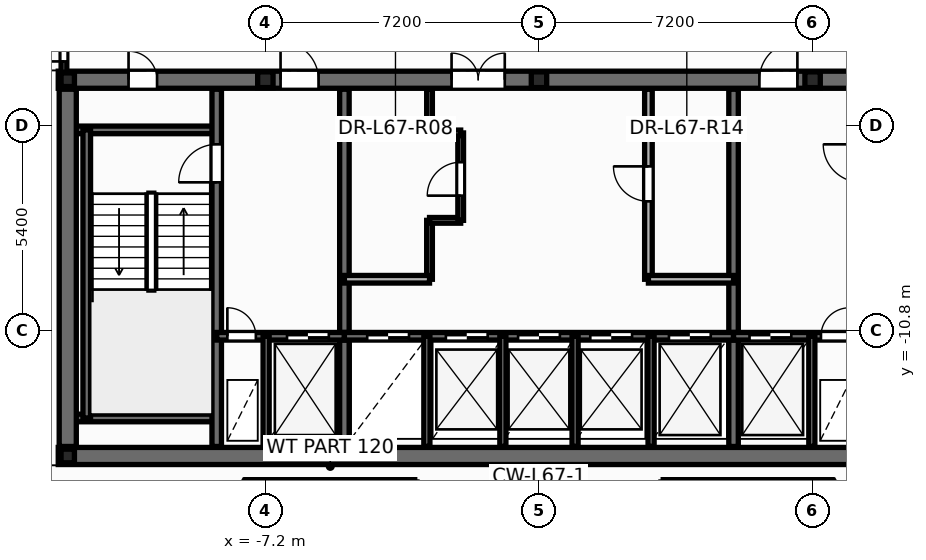
"""IFC4 building model, lengths in metres.
Left out: names, types, materials, properties, quantities, classifications, styles, units other than length and angle.
Written with IfcOpenShell. Run it as: python <this file> out.ifc"""

import sys

from ifc_helpers import new_model, si_unit, direction, frame, frame_2d, origin, origin_2d, place, context, subcontext, project, spatial, rectangle, i_section, extrude, element, fill, save


model = new_model("IFC4")
c1 = context("Model", 3, precision=1e-05, world=origin(), true_north=direction((0.0, 1.0)))
c2 = subcontext(c1, "Body", "Model", "MODEL_VIEW")
j1 = project(units=[si_unit("LENGTHUNIT", "METRE"), si_unit("PLANEANGLEUNIT", "RADIAN")], contexts=[c1])
p1 = place(None, origin())
s1 = spatial("IfcSite", under=j1, at=p1, CompositionType="ELEMENT")
p2 = place(p1, origin())
s2 = spatial("IfcBuilding", under=s1, at=p2, CompositionType="ELEMENT")
p3 = place(p2, frame((0.0, 0.0, 256.2)))
s3 = spatial("IfcBuildingStorey", under=s2, at=p3, CompositionType="ELEMENT", Elevation=256.2)
for number, where, z_axis, x_axis in (
    (1, (-12.4, -14.1, 0.0), (0.0, 0.0, 1.0), (1.0, 0.0, 0.0)),
    (2, (-12.4, -4.2, 0.0), (0.0, 0.0, 1.0), (1.0, 0.0, 0.0)),
):
    element("IfcColumn", number, at=place(p3, frame(where, z_axis=z_axis, x_axis=x_axis)), inside=s3, PredefinedType="COLUMN", context=c2, shape_type="SweptSolid", body=[
        extrude(i_section(OverallWidth=0.352, OverallDepth=0.359, WebThickness=0.018, FlangeThickness=0.026, at=origin_2d()), origin(), (0.0, 0.0, 1.0), 3.6),
    ])
for number, where, z_axis, x_axis in (
    (3, (-7.2, -4.2, 0.0), (0.0, 0.0, 1.0), (1.0, 0.0, 0.0)),
    (4, (0.0, -4.2, 0.0), (0.0, 0.0, 1.0), (1.0, 0.0, 0.0)),
    (5, (7.2, -4.2, 0.0), (0.0, 0.0, 1.0), (1.0, 0.0, 0.0)),
):
    element("IfcColumn", number, at=place(p3, frame(where, z_axis=z_axis, x_axis=x_axis)), inside=s3, PredefinedType="PILASTER", context=c2, shape_type="SweptSolid", body=[
        extrude(i_section(OverallWidth=0.405, OverallDepth=0.414, WebThickness=0.022, FlangeThickness=0.032, at=origin_2d()), origin(), (0.0, 0.0, 1.0), 3.6),
    ])
p4 = place(p3, frame((-2.88, -9.45, 0.0), z_axis=(0.0, 0.0, 1.0), x_axis=(0.0, 1.0, 0.0)))
e6 = element("IfcWall", 6, at=p4, inside=s3, PredefinedType="PARTITIONING", context=c2, shape_type="SweptSolid", body=[
    extrude(rectangle(XDim=1.55, YDim=0.15, at=frame_2d((0.775, 0.0))), origin(), (0.0, 0.0, 1.0), 3.345),
])
p5 = place(p3, frame((-2.88, -7.9, 0.0), z_axis=(0.0, 0.0, 1.0), x_axis=(1.0, 0.0, 0.0)))
e7 = element("IfcWall", 7, at=p5, inside=s3, PredefinedType="PARTITIONING", context=c2, shape_type="SweptSolid", body=[
    extrude(rectangle(XDim=0.82, YDim=0.15, at=frame_2d((0.41, 0.0))), origin(), (0.0, 0.0, 1.0), 3.345),
])
p6 = place(p3, frame((-2.06, -7.9, 0.0), z_axis=(0.0, 0.0, 1.0), x_axis=(0.0, 1.0, 0.0)))
e8 = element("IfcWall", 8, at=p6, inside=s3, PredefinedType="PARTITIONING", context=c2, shape_type="SweptSolid", body=[
    extrude(rectangle(XDim=2.3, YDim=0.15, at=frame_2d((1.15, 0.0))), origin(), (0.0, 0.0, 1.0), 3.345),
])
p7 = place(p6, frame((0.65, 0.0, 0.0)))
e9 = element("IfcOpeningElement", 9, at=p7, cuts=e8, PredefinedType="OPENING", context=c2, shape_type="SweptSolid", body=[
    extrude(rectangle(XDim=0.886, YDim=2.104, at=frame_2d((0.44, 1.052))), frame((0.0, 0.085, 0.0), z_axis=(0.0, -1.0, 0.0), x_axis=(1.0, 0.0, 0.0)), (0.0, 0.0, 1.0), 0.17),
])
p8 = place(p3, frame((-2.88, -5.6, 0.0), z_axis=(0.0, 0.0, 1.0), x_axis=(1.0, 0.0, 0.0)))
e10 = element("IfcWall", 10, at=p8, inside=s3, PredefinedType="PARTITIONING", context=c2, shape_type="SweptSolid", body=[
    extrude(rectangle(XDim=0.82, YDim=0.15, at=frame_2d((0.41, 0.0))), origin(), (0.0, 0.0, 1.0), 3.345),
])
p9 = place(p3, frame((-2.88, -5.6, 0.0), z_axis=(0.0, 0.0, 1.0), x_axis=(0.0, 1.0, 0.0)))
e11 = element("IfcWall", 11, at=p9, inside=s3, PredefinedType="PARTITIONING", context=c2, shape_type="SweptSolid", body=[
    extrude(rectangle(XDim=1.15, YDim=0.15, at=frame_2d((0.575, 0.0))), origin(), (0.0, 0.0, 1.0), 3.345),
])
p10 = place(p3, frame((-12.65, -14.1, 0.0), z_axis=(0.0, 0.0, 1.0), x_axis=(1.0, 0.0, 0.0)))
e12 = element("IfcWall", 12, at=p10, inside=s3, PredefinedType="SHEAR", context=c2, shape_type="SweptSolid", body=[
    extrude(rectangle(XDim=25.3, YDim=0.45, at=frame_2d((12.65, 0.0))), origin(), (0.0, 0.0, 1.0), 3.6),
])
p11 = place(p3, frame((-12.65, -4.2, 0.0), z_axis=(0.0, 0.0, 1.0), x_axis=(1.0, 0.0, 0.0)))
e13 = element("IfcWall", 13, at=p11, inside=s3, PredefinedType="SHEAR", context=c2, shape_type="SweptSolid", body=[
    extrude(rectangle(XDim=25.3, YDim=0.45, at=frame_2d((12.65, 0.0))), origin(), (0.0, 0.0, 1.0), 3.6),
])
p12 = place(p11, frame((1.85, 0.0, 0.0)))
e14 = element("IfcOpeningElement", 14, at=p12, cuts=e13, PredefinedType="OPENING", context=c2, shape_type="SweptSolid", body=[
    extrude(rectangle(XDim=0.756, YDim=2.054, at=frame_2d((0.375, 1.027))), frame((0.0, 0.235, 0.0), z_axis=(0.0, -1.0, 0.0), x_axis=(1.0, 0.0, 0.0)), (0.0, 0.0, 1.0), 0.47),
])
p13 = place(p11, frame((21.85, 0.0, 0.0)))
e15 = element("IfcOpeningElement", 15, at=p13, cuts=e13, PredefinedType="OPENING", context=c2, shape_type="SweptSolid", body=[
    extrude(rectangle(XDim=0.756, YDim=2.054, at=frame_2d((0.375, 1.027))), frame((0.0, 0.235, 0.0), z_axis=(0.0, -1.0, 0.0), x_axis=(1.0, 0.0, 0.0)), (0.0, 0.0, 1.0), 0.47),
])
p14 = place(p11, frame((23.5, 0.0, 0.0)))
e16 = element("IfcOpeningElement", 16, at=p14, cuts=e13, PredefinedType="OPENING", context=c2, shape_type="SweptSolid", body=[
    extrude(rectangle(XDim=0.756, YDim=2.054, at=frame_2d((0.375, 1.027))), frame((0.0, 0.235, 0.0), z_axis=(0.0, -1.0, 0.0), x_axis=(1.0, 0.0, 0.0)), (0.0, 0.0, 1.0), 0.47),
])
p15 = place(p11, frame((5.85, 0.0, 0.0)))
e17 = element("IfcOpeningElement", 17, at=p15, cuts=e13, PredefinedType="OPENING", context=c2, shape_type="SweptSolid", body=[
    extrude(rectangle(XDim=1.006, YDim=2.104, at=frame_2d((0.5, 1.052))), frame((0.0, 0.235, 0.0), z_axis=(0.0, -1.0, 0.0), x_axis=(1.0, 0.0, 0.0)), (0.0, 0.0, 1.0), 0.47),
])
p16 = place(p11, frame((10.35, 0.0, 0.0)))
e18 = element("IfcOpeningElement", 18, at=p16, cuts=e13, PredefinedType="OPENING", context=c2, shape_type="SweptSolid", body=[
    extrude(rectangle(XDim=1.406, YDim=2.154, at=frame_2d((0.7, 1.077))), frame((0.0, 0.235, 0.0), z_axis=(0.0, -1.0, 0.0), x_axis=(1.0, 0.0, 0.0)), (0.0, 0.0, 1.0), 0.47),
])
p17 = place(p11, frame((18.45, 0.0, 0.0)))
e19 = element("IfcOpeningElement", 19, at=p17, cuts=e13, PredefinedType="OPENING", context=c2, shape_type="SweptSolid", body=[
    extrude(rectangle(XDim=1.006, YDim=2.104, at=frame_2d((0.5, 1.052))), frame((0.0, 0.235, 0.0), z_axis=(0.0, -1.0, 0.0), x_axis=(1.0, 0.0, 0.0)), (0.0, 0.0, 1.0), 0.47),
])
for number, where, z_axis, x_axis in (
    (20, (-12.35, -5.52, 0.0), (0.0, 0.0, 1.0), (1.0, 0.0, 0.0)),
    (21, (-12.35, -13.1, 0.0), (0.0, 0.0, 1.0), (1.0, 0.0, 0.0)),
):
    element("IfcWall", number, at=place(p3, frame(where, z_axis=z_axis, x_axis=x_axis)), inside=s3, PredefinedType="SOLIDWALL", context=c2, shape_type="SweptSolid", body=[
        extrude(rectangle(XDim=3.87, YDim=0.2, at=frame_2d((1.935, 0.0))), origin(), (0.0, 0.0, 1.0), 3.6),
    ])
p18 = place(p3, frame((-11.9, -13.1, 0.0), z_axis=(0.0, 0.0, 1.0), x_axis=(0.0, 1.0, 0.0)))
e22 = element("IfcWall", 22, at=p18, inside=s3, PredefinedType="SOLIDWALL", context=c2, shape_type="SweptSolid", body=[
    extrude(rectangle(XDim=7.58, YDim=0.2, at=frame_2d((3.79, 0.0))), origin(), (0.0, 0.0, 1.0), 3.6),
])
p19 = place(p3, frame((-8.48, -13.85, 0.0), z_axis=(0.0, 0.0, 1.0), x_axis=(0.0, 1.0, 0.0)))
e23 = element("IfcWall", 23, at=p19, inside=s3, PredefinedType="SHEAR", context=c2, shape_type="SweptSolid", body=[
    extrude(rectangle(XDim=9.4, YDim=0.25, at=frame_2d((4.7, 0.0))), origin(), (0.0, 0.0, 1.0), 3.6),
])
p20 = place(p19, frame((6.95, 0.0, 0.0)))
e24 = element("IfcOpeningElement", 24, at=p20, cuts=e23, PredefinedType="OPENING", context=c2, shape_type="SweptSolid", body=[
    extrude(rectangle(XDim=1.006, YDim=2.104, at=frame_2d((0.5, 1.052))), frame((0.0, 0.135, 0.0), z_axis=(0.0, -1.0, 0.0), x_axis=(1.0, 0.0, 0.0)), (0.0, 0.0, 1.0), 0.27),
])
for number, where, z_axis, x_axis in (
    (25, (-5.12, -13.85, 0.0), (0.0, 0.0, 1.0), (0.0, 1.0, 0.0)),
    (26, (5.12, -13.85, 0.0), (0.0, 0.0, 1.0), (0.0, 1.0, 0.0)),
):
    element("IfcWall", number, at=place(p3, frame(where, z_axis=z_axis, x_axis=x_axis)), inside=s3, PredefinedType="SHEAR", context=c2, shape_type="SweptSolid", body=[
        extrude(rectangle(XDim=9.4, YDim=0.25, at=frame_2d((4.7, 0.0))), origin(), (0.0, 0.0, 1.0), 3.6),
    ])
p21 = place(p3, frame((-8.48, -10.95, 0.0), z_axis=(0.0, 0.0, 1.0), x_axis=(1.0, 0.0, 0.0)))
e27 = element("IfcWall", 27, at=p21, inside=s3, PredefinedType="SOLIDWALL", context=c2, shape_type="SweptSolid", body=[
    extrude(rectangle(XDim=3.36, YDim=0.2, at=frame_2d((1.68, 0.0))), origin(), (0.0, 0.0, 1.0), 3.6),
])
p22 = place(p21, frame((0.28, 0.0, 0.0)))
e28 = element("IfcOpeningElement", 28, at=p22, cuts=e27, PredefinedType="OPENING", context=c2, shape_type="SweptSolid", body=[
    extrude(rectangle(XDim=0.756, YDim=2.054, at=frame_2d((0.375, 1.027))), frame((0.0, 0.11, 0.0), z_axis=(0.0, -1.0, 0.0), x_axis=(1.0, 0.0, 0.0)), (0.0, 0.0, 1.0), 0.22),
])
p23 = place(p21, frame((1.85, 0.0, 0.0)))
e29 = element("IfcOpeningElement", 29, at=p23, cuts=e27, PredefinedType="OPENING", context=c2, shape_type="SweptSolid", body=[
    extrude(rectangle(XDim=1.106, YDim=2.104, at=frame_2d((0.55, 1.052))), frame((0.0, 0.11, 0.0), z_axis=(0.0, -1.0, 0.0), x_axis=(1.0, 0.0, 0.0)), (0.0, 0.0, 1.0), 0.22),
])
p24 = place(p3, frame((-5.12, -10.95, 0.0), z_axis=(0.0, 0.0, 1.0), x_axis=(1.0, 0.0, 0.0)))
e30 = element("IfcWall", 30, at=p24, inside=s3, PredefinedType="SOLIDWALL", context=c2, shape_type="SweptSolid", body=[
    extrude(rectangle(XDim=10.24, YDim=0.2, at=frame_2d((5.12, 0.0))), origin(), (0.0, 0.0, 1.0), 3.6),
])
p25 = place(p24, frame((0.6, 0.0, 0.0)))
e31 = element("IfcOpeningElement", 31, at=p25, cuts=e30, PredefinedType="OPENING", context=c2, shape_type="SweptSolid", body=[
    extrude(rectangle(XDim=1.106, YDim=2.104, at=frame_2d((0.55, 1.052))), frame((0.0, 0.11, 0.0), z_axis=(0.0, -1.0, 0.0), x_axis=(1.0, 0.0, 0.0)), (0.0, 0.0, 1.0), 0.22),
])
p26 = place(p24, frame((2.67, 0.0, 0.0)))
e32 = element("IfcOpeningElement", 32, at=p26, cuts=e30, PredefinedType="OPENING", context=c2, shape_type="SweptSolid", body=[
    extrude(rectangle(XDim=1.106, YDim=2.104, at=frame_2d((0.55, 1.052))), frame((0.0, 0.11, 0.0), z_axis=(0.0, -1.0, 0.0), x_axis=(1.0, 0.0, 0.0)), (0.0, 0.0, 1.0), 0.22),
])
p27 = place(p24, frame((4.57, 0.0, 0.0)))
e33 = element("IfcOpeningElement", 33, at=p27, cuts=e30, PredefinedType="OPENING", context=c2, shape_type="SweptSolid", body=[
    extrude(rectangle(XDim=1.106, YDim=2.104, at=frame_2d((0.55, 1.052))), frame((0.0, 0.11, 0.0), z_axis=(0.0, -1.0, 0.0), x_axis=(1.0, 0.0, 0.0)), (0.0, 0.0, 1.0), 0.22),
])
p28 = place(p24, frame((6.47, 0.0, 0.0)))
e34 = element("IfcOpeningElement", 34, at=p28, cuts=e30, PredefinedType="OPENING", context=c2, shape_type="SweptSolid", body=[
    extrude(rectangle(XDim=1.106, YDim=2.104, at=frame_2d((0.55, 1.052))), frame((0.0, 0.11, 0.0), z_axis=(0.0, -1.0, 0.0), x_axis=(1.0, 0.0, 0.0)), (0.0, 0.0, 1.0), 0.22),
])
p29 = place(p24, frame((8.54, 0.0, 0.0)))
e35 = element("IfcOpeningElement", 35, at=p29, cuts=e30, PredefinedType="OPENING", context=c2, shape_type="SweptSolid", body=[
    extrude(rectangle(XDim=1.106, YDim=2.104, at=frame_2d((0.55, 1.052))), frame((0.0, 0.11, 0.0), z_axis=(0.0, -1.0, 0.0), x_axis=(1.0, 0.0, 0.0)), (0.0, 0.0, 1.0), 0.22),
])
p30 = place(p3, frame((5.12, -10.95, 0.0), z_axis=(0.0, 0.0, 1.0), x_axis=(1.0, 0.0, 0.0)))
e36 = element("IfcWall", 36, at=p30, inside=s3, PredefinedType="SOLIDWALL", context=c2, shape_type="SweptSolid", body=[
    extrude(rectangle(XDim=3.36, YDim=0.2, at=frame_2d((1.68, 0.0))), origin(), (0.0, 0.0, 1.0), 3.6),
])
p31 = place(p30, frame((0.42, 0.0, 0.0)))
e37 = element("IfcOpeningElement", 37, at=p31, cuts=e36, PredefinedType="OPENING", context=c2, shape_type="SweptSolid", body=[
    extrude(rectangle(XDim=1.106, YDim=2.104, at=frame_2d((0.55, 1.052))), frame((0.0, 0.11, 0.0), z_axis=(0.0, -1.0, 0.0), x_axis=(1.0, 0.0, 0.0)), (0.0, 0.0, 1.0), 0.22),
])
p32 = place(p30, frame((2.3, 0.0, 0.0)))
e38 = element("IfcOpeningElement", 38, at=p32, cuts=e36, PredefinedType="OPENING", context=c2, shape_type="SweptSolid", body=[
    extrude(rectangle(XDim=0.756, YDim=2.054, at=frame_2d((0.375, 1.027))), frame((0.0, 0.11, 0.0), z_axis=(0.0, -1.0, 0.0), x_axis=(1.0, 0.0, 0.0)), (0.0, 0.0, 1.0), 0.22),
])
for number, where, z_axis, x_axis in (
    (39, (-7.18, -13.85, 0.0), (0.0, 0.0, 1.0), (0.0, 1.0, 0.0)),
    (40, (7.18, -13.85, 0.0), (0.0, 0.0, 1.0), (0.0, 1.0, 0.0)),
    (41, (-2.95, -13.85, 0.0), (0.0, 0.0, 1.0), (0.0, 1.0, 0.0)),
    (42, (2.95, -13.85, 0.0), (0.0, 0.0, 1.0), (0.0, 1.0, 0.0)),
):
    element("IfcWall", number, at=place(p3, frame(where, z_axis=z_axis, x_axis=x_axis)), inside=s3, PredefinedType="PARTITIONING", context=c2, shape_type="SweptSolid", body=[
        extrude(rectangle(XDim=2.9, YDim=0.16, at=frame_2d((1.45, 0.0))), origin(), (0.0, 0.0, 1.0), 2.57),
    ])
p33 = place(p3, frame((-12.4, -13.85, 0.0), z_axis=(0.0, 0.0, 1.0), x_axis=(0.0, 1.0, 0.0)))
e43 = element("IfcWall", 43, at=p33, inside=s3, PredefinedType="SHEAR", context=c2, shape_type="SweptSolid", body=[
    extrude(rectangle(XDim=9.4, YDim=0.45, at=frame_2d((4.7, 0.0))), origin(), (0.0, 0.0, 1.0), 3.6),
])
p34 = place(p3, frame((-5.12, -9.45, 0.0), z_axis=(0.0, 0.0, 1.0), x_axis=(1.0, 0.0, 0.0)))
e44 = element("IfcWall", 44, at=p34, inside=s3, PredefinedType="SOLIDWALL", context=c2, shape_type="SweptSolid", body=[
    extrude(rectangle(XDim=2.24, YDim=0.2, at=frame_2d((1.12, 0.0))), origin(), (0.0, 0.0, 1.0), 3.345),
])
p35 = place(p3, frame((2.88, -9.45, 0.0), z_axis=(0.0, 0.0, 1.0), x_axis=(0.0, 1.0, 0.0)))
e45 = element("IfcWall", 45, at=p35, inside=s3, PredefinedType="SOLIDWALL", context=c2, shape_type="SweptSolid", body=[
    extrude(rectangle(XDim=5.0, YDim=0.2, at=frame_2d((2.5, 0.0))), origin(), (0.0, 0.0, 1.0), 3.345),
])
p36 = place(p35, frame((2.05, 0.0, 0.0)))
e46 = element("IfcOpeningElement", 46, at=p36, cuts=e45, PredefinedType="OPENING", context=c2, shape_type="SweptSolid", body=[
    extrude(rectangle(XDim=0.926, YDim=2.104, at=frame_2d((0.46, 1.052))), frame((0.0, 0.11, 0.0), z_axis=(0.0, -1.0, 0.0), x_axis=(1.0, 0.0, 0.0)), (0.0, 0.0, 1.0), 0.22),
])
p37 = place(p3, frame((2.88, -9.45, 0.0), z_axis=(0.0, 0.0, 1.0), x_axis=(1.0, 0.0, 0.0)))
e47 = element("IfcWall", 47, at=p37, inside=s3, PredefinedType="SOLIDWALL", context=c2, shape_type="SweptSolid", body=[
    extrude(rectangle(XDim=2.24, YDim=0.2, at=frame_2d((1.12, 0.0))), origin(), (0.0, 0.0, 1.0), 3.345),
])
for number, where, z_axis, x_axis in (
    (48, (-0.95, -13.85, 0.0), (0.0, 0.0, 1.0), (0.0, 1.0, 0.0)),
    (49, (0.95, -13.85, 0.0), (0.0, 0.0, 1.0), (0.0, 1.0, 0.0)),
):
    element("IfcWall", number, at=place(p3, frame(where, z_axis=z_axis, x_axis=x_axis)), inside=s3, PredefinedType="PARTITIONING", context=c2, shape_type="SweptSolid", body=[
        extrude(rectangle(XDim=2.9, YDim=0.16, at=frame_2d((1.45, 0.0))), origin(), (0.0, 0.0, 1.0), 2.57),
    ])
for number, where, z_axis, x_axis in (
    (50, (-7.715, -14.783, 0.0), (0.0, 0.0, 1.0), (1.0, 0.0, 0.0)),
    (51, (3.27, -14.783, 0.0), (0.0, 0.0, 1.0), (1.0, 0.0, 0.0)),
):
    element("IfcWall", number, at=place(p3, frame(where, z_axis=z_axis, x_axis=x_axis)), inside=s3, PredefinedType="PARTITIONING", context=c2, shape_type="SweptSolid", body=[
        extrude(rectangle(XDim=4.445, YDim=0.12, at=frame_2d((2.223, 0.0))), origin(), (0.0, 0.0, 1.0), 3.345),
    ])
p38 = place(p3, frame((-12.5, -4.24, 0.0), z_axis=(0.0, 0.0, 1.0), x_axis=(0.0, 1.0, 0.0)))
e52 = element("IfcWall", 52, at=p38, inside=s3, PredefinedType="PARTITIONING", context=c2, shape_type="SweptSolid", body=[
    extrude(rectangle(XDim=1.48, YDim=0.15, at=frame_2d((0.74, 0.0))), origin(), (0.0, 0.0, 1.0), 2.32),
])
p39 = place(p38, frame((0.522, 0.0, 0.0)))
e53 = element("IfcOpeningElement", 53, at=p39, cuts=e52, PredefinedType="OPENING", context=c2, shape_type="SweptSolid", body=[
    extrude(rectangle(XDim=0.826, YDim=2.104, at=frame_2d((0.41, 1.052))), frame((0.0, 0.085, 0.0), z_axis=(0.0, -1.0, 0.0), x_axis=(1.0, 0.0, 0.0)), (0.0, 0.0, 1.0), 0.17),
])
p40 = place(p7, origin())
e54 = element("IfcDoor", 54, at=p40, inside=s3, OperationType="SINGLE_SWING_LEFT", PredefinedType="DOOR", context=c2, shape_type="SweptSolid", body=[
    extrude(rectangle(XDim=0.88, YDim=2.1, at=frame_2d((0.44, 1.05))), frame((0.0, 0.025, 0.0), z_axis=(0.0, -1.0, 0.0), x_axis=(1.0, 0.0, 0.0)), (0.0, 0.0, 1.0), 0.05),
])
fill(e9, e54)
p41 = place(p36, origin())
e55 = element("IfcDoor", 55, at=p41, inside=s3, OperationType="SINGLE_SWING_RIGHT", PredefinedType="DOOR", context=c2, shape_type="SweptSolid", body=[
    extrude(rectangle(XDim=0.92, YDim=2.1, at=frame_2d((0.46, 1.05))), frame((0.0, 0.025, 0.0), z_axis=(0.0, -1.0, 0.0), x_axis=(1.0, 0.0, 0.0)), (0.0, 0.0, 1.0), 0.05),
])
fill(e46, e55)
p42 = place(p20, origin())
e56 = element("IfcDoor", 56, at=p42, inside=s3, OperationType="SINGLE_SWING_LEFT", PredefinedType="DOOR", context=c2, shape_type="SweptSolid", body=[
    extrude(rectangle(XDim=1.0, YDim=2.1, at=frame_2d((0.5, 1.05))), frame((0.0, 0.025, 0.0), z_axis=(0.0, -1.0, 0.0), x_axis=(1.0, 0.0, 0.0)), (0.0, 0.0, 1.0), 0.05),
])
fill(e24, e56)
p43 = place(p22, origin())
e57 = element("IfcDoor", 57, at=p43, inside=s3, OperationType="SINGLE_SWING_LEFT", PredefinedType="DOOR", context=c2, shape_type="SweptSolid", body=[
    extrude(rectangle(XDim=0.75, YDim=2.05, at=frame_2d((0.375, 1.025))), frame((0.0, 0.025, 0.0), z_axis=(0.0, -1.0, 0.0), x_axis=(1.0, 0.0, 0.0)), (0.0, 0.0, 1.0), 0.05),
])
fill(e28, e57)
p44 = place(p23, origin())
e58 = element("IfcDoor", 58, at=p44, inside=s3, OperationType="DOUBLE_DOOR_SLIDING", PredefinedType="DOOR", context=c2, shape_type="SweptSolid", body=[
    extrude(rectangle(XDim=1.1, YDim=2.1, at=frame_2d((0.55, 1.05))), frame((0.0, 0.025, 0.0), z_axis=(0.0, -1.0, 0.0), x_axis=(1.0, 0.0, 0.0)), (0.0, 0.0, 1.0), 0.05),
])
fill(e29, e58)
p45 = place(p31, origin())
e59 = element("IfcDoor", 59, at=p45, inside=s3, OperationType="DOUBLE_DOOR_SLIDING", PredefinedType="DOOR", context=c2, shape_type="SweptSolid", body=[
    extrude(rectangle(XDim=1.1, YDim=2.1, at=frame_2d((0.55, 1.05))), frame((0.0, 0.025, 0.0), z_axis=(0.0, -1.0, 0.0), x_axis=(1.0, 0.0, 0.0)), (0.0, 0.0, 1.0), 0.05),
])
fill(e37, e59)
p46 = place(p32, origin())
e60 = element("IfcDoor", 60, at=p46, inside=s3, OperationType="SINGLE_SWING_RIGHT", PredefinedType="DOOR", context=c2, shape_type="SweptSolid", body=[
    extrude(rectangle(XDim=0.75, YDim=2.05, at=frame_2d((0.375, 1.025))), frame((0.0, 0.025, 0.0), z_axis=(0.0, -1.0, 0.0), x_axis=(1.0, 0.0, 0.0)), (0.0, 0.0, 1.0), 0.05),
])
fill(e38, e60)
p47 = place(p25, origin())
e61 = element("IfcDoor", 61, at=p47, inside=s3, OperationType="DOUBLE_DOOR_SLIDING", PredefinedType="DOOR", context=c2, shape_type="SweptSolid", body=[
    extrude(rectangle(XDim=1.1, YDim=2.1, at=frame_2d((0.55, 1.05))), frame((0.0, 0.025, 0.0), z_axis=(0.0, -1.0, 0.0), x_axis=(1.0, 0.0, 0.0)), (0.0, 0.0, 1.0), 0.05),
])
fill(e31, e61)
p48 = place(p26, origin())
e62 = element("IfcDoor", 62, at=p48, inside=s3, OperationType="DOUBLE_DOOR_SLIDING", PredefinedType="DOOR", context=c2, shape_type="SweptSolid", body=[
    extrude(rectangle(XDim=1.1, YDim=2.1, at=frame_2d((0.55, 1.05))), frame((0.0, 0.025, 0.0), z_axis=(0.0, -1.0, 0.0), x_axis=(1.0, 0.0, 0.0)), (0.0, 0.0, 1.0), 0.05),
])
fill(e32, e62)
p49 = place(p27, origin())
e63 = element("IfcDoor", 63, at=p49, inside=s3, OperationType="DOUBLE_DOOR_SLIDING", PredefinedType="DOOR", context=c2, shape_type="SweptSolid", body=[
    extrude(rectangle(XDim=1.1, YDim=2.1, at=frame_2d((0.55, 1.05))), frame((0.0, 0.025, 0.0), z_axis=(0.0, -1.0, 0.0), x_axis=(1.0, 0.0, 0.0)), (0.0, 0.0, 1.0), 0.05),
])
fill(e33, e63)
p50 = place(p28, origin())
e64 = element("IfcDoor", 64, at=p50, inside=s3, OperationType="DOUBLE_DOOR_SLIDING", PredefinedType="DOOR", context=c2, shape_type="SweptSolid", body=[
    extrude(rectangle(XDim=1.1, YDim=2.1, at=frame_2d((0.55, 1.05))), frame((0.0, 0.025, 0.0), z_axis=(0.0, -1.0, 0.0), x_axis=(1.0, 0.0, 0.0)), (0.0, 0.0, 1.0), 0.05),
])
fill(e34, e64)
p51 = place(p29, origin())
e65 = element("IfcDoor", 65, at=p51, inside=s3, OperationType="DOUBLE_DOOR_SLIDING", PredefinedType="DOOR", context=c2, shape_type="SweptSolid", body=[
    extrude(rectangle(XDim=1.1, YDim=2.1, at=frame_2d((0.55, 1.05))), frame((0.0, 0.025, 0.0), z_axis=(0.0, -1.0, 0.0), x_axis=(1.0, 0.0, 0.0)), (0.0, 0.0, 1.0), 0.05),
])
fill(e35, e65)
p52 = place(p12, origin())
e66 = element("IfcDoor", 66, at=p52, inside=s3, OperationType="SINGLE_SWING_LEFT", PredefinedType="DOOR", context=c2, shape_type="SweptSolid", body=[
    extrude(rectangle(XDim=0.75, YDim=2.05, at=frame_2d((0.375, 1.025))), frame((0.0, 0.025, 0.0), z_axis=(0.0, -1.0, 0.0), x_axis=(1.0, 0.0, 0.0)), (0.0, 0.0, 1.0), 0.05),
])
fill(e14, e66)
p53 = place(p15, origin())
e67 = element("IfcDoor", 67, at=p53, inside=s3, OperationType="SINGLE_SWING_LEFT", PredefinedType="DOOR", context=c2, shape_type="SweptSolid", body=[
    extrude(rectangle(XDim=1.0, YDim=2.1, at=frame_2d((0.5, 1.05))), frame((0.0, 0.025, 0.0), z_axis=(0.0, -1.0, 0.0), x_axis=(1.0, 0.0, 0.0)), (0.0, 0.0, 1.0), 0.05),
])
fill(e17, e67)
p54 = place(p16, origin())
e68 = element("IfcDoor", 68, at=p54, inside=s3, OperationType="DOUBLE_DOOR_SINGLE_SWING", PredefinedType="DOOR", context=c2, shape_type="SweptSolid", body=[
    extrude(rectangle(XDim=1.4, YDim=2.15, at=frame_2d((0.7, 1.075))), frame((0.0, 0.025, 0.0), z_axis=(0.0, -1.0, 0.0), x_axis=(1.0, 0.0, 0.0)), (0.0, 0.0, 1.0), 0.05),
])
fill(e18, e68)
p55 = place(p17, origin())
e69 = element("IfcDoor", 69, at=p55, inside=s3, OperationType="SINGLE_SWING_RIGHT", PredefinedType="DOOR", context=c2, shape_type="SweptSolid", body=[
    extrude(rectangle(XDim=1.0, YDim=2.1, at=frame_2d((0.5, 1.05))), frame((0.0, 0.025, 0.0), z_axis=(0.0, -1.0, 0.0), x_axis=(1.0, 0.0, 0.0)), (0.0, 0.0, 1.0), 0.05),
])
fill(e19, e69)
p56 = place(p39, origin())
e70 = element("IfcDoor", 70, at=p56, inside=s3, OperationType="SINGLE_SWING_LEFT", PredefinedType="DOOR", context=c2, shape_type="SweptSolid", body=[
    extrude(rectangle(XDim=0.82, YDim=2.1, at=frame_2d((0.41, 1.05))), frame((0.0, 0.025, 0.0), z_axis=(0.0, -1.0, 0.0), x_axis=(1.0, 0.0, 0.0)), (0.0, 0.0, 1.0), 0.05),
])
fill(e53, e70)
save(model, sys.argv[1])
